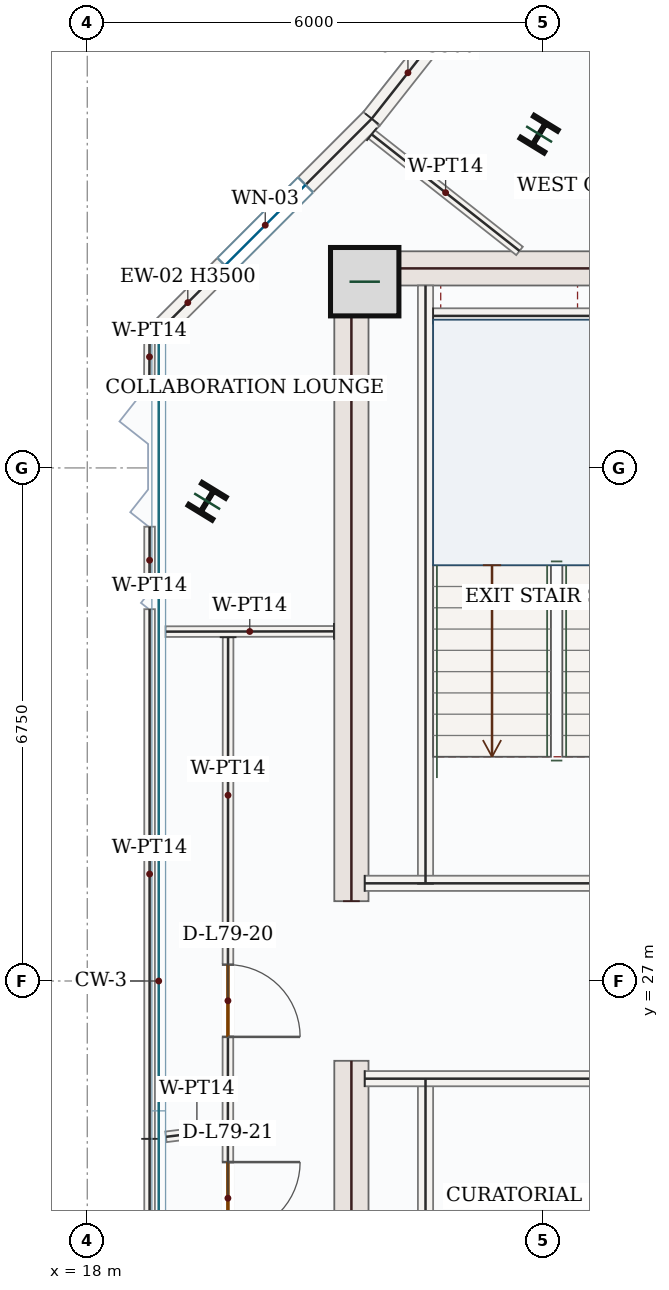
"""IFC4 building model, lengths in metres.
Left out: names, types, materials, properties, quantities, classifications, styles, units other than length and angle.
Written with IfcOpenShell. Run it as: python <this file> out.ifc"""

import sys

from ifc_helpers import new_model, si_unit, direction, frame, frame_2d, origin, origin_2d, place, context, subcontext, project, spatial, rectangle, i_section, extrude, source, transform, mapped, element, fill, save


model = new_model("IFC4")
c1 = context("Model", 3, precision=1e-05, world=origin(), true_north=direction((0.0, 1.0)))
c2 = subcontext(c1, "Body", "Model", "MODEL_VIEW")
j1 = project(units=[si_unit("LENGTHUNIT", "METRE"), si_unit("PLANEANGLEUNIT", "RADIAN")], contexts=[c1])
p1 = place(None, origin())
s1 = spatial("IfcSite", under=j1, at=p1, CompositionType="ELEMENT")
p2 = place(p1, origin())
s2 = spatial("IfcBuilding", under=s1, at=p2, CompositionType="ELEMENT")
p3 = place(p2, frame((0.0, 0.0, 327.3)))
s3 = spatial("IfcBuildingStorey", under=s2, at=p3, CompositionType="ELEMENT", Elevation=327.3)
m1 = source(origin(), c2, "Body", "SweptSolid", [
    extrude(rectangle(XDim=8.55, YDim=0.45, at=frame_2d((4.275, 0.0))), origin(), (0.0, 0.0, 1.0), 3.5),
])
for number, where, z_axis, x_axis in (
    (1, (21.475, 17.4, 0.0), (0.0, 0.0, 1.0), (0.0, 1.0, 0.0)),
    (2, (21.475, 28.05, 0.0), (0.0, 0.0, 1.0), (0.0, 1.0, 0.0)),
):
    element("IfcWall", number, at=place(p3, frame(where, z_axis=z_axis, x_axis=x_axis)), inside=s3, PredefinedType="SHEAR", context=c2, shape_type="MappedRepresentation", body=[
        mapped(m1, transform((0.0, 0.0, 0.0), x_axis=(1.0, 0.0, 0.0), y_axis=(0.0, 1.0, 0.0), z_axis=(0.0, 0.0, 1.0), scale=1.0)),
    ])
m2 = source(origin(), c2, "Body", "SweptSolid", [
    extrude(rectangle(XDim=7.1, YDim=0.45, at=frame_2d((3.55, 0.0))), origin(), (0.0, 0.0, 1.0), 3.5),
])
p4 = place(p3, frame((21.7, 36.375, 0.0), z_axis=(0.0, 0.0, 1.0), x_axis=(1.0, 0.0, 0.0)))
e3 = element("IfcWall", 3, at=p4, inside=s3, PredefinedType="SHEAR", context=c2, shape_type="MappedRepresentation", body=[
    mapped(m2, transform((0.0, 0.0, 0.0), x_axis=(1.0, 0.0, 0.0), y_axis=(0.0, 1.0, 0.0), z_axis=(0.0, 0.0, 1.0), scale=1.0)),
])
m3 = source(origin(), c2, "Body", "SweptSolid", [
    extrude(rectangle(XDim=0.9, YDim=0.9, at=origin_2d()), origin(), (0.0, 0.0, 1.0), 3.75),
])
p5 = place(p3, frame((21.65, 36.2, 0.0), z_axis=(0.0, 0.0, 1.0), x_axis=(1.0, 0.0, 0.0)))
e4 = element("IfcColumn", 4, at=p5, inside=s3, PredefinedType="COLUMN", context=c2, shape_type="MappedRepresentation", body=[
    mapped(m3, transform((0.0, 0.0, 0.0), x_axis=(1.0, 0.0, 0.0), y_axis=(0.0, 1.0, 0.0), z_axis=(0.0, 0.0, 1.0), scale=1.0)),
])
m4 = source(origin(), c2, "Body", "SweptSolid", [
    extrude(i_section(OverallWidth=0.369, OverallDepth=0.356, WebThickness=0.011, FlangeThickness=0.018, FilletRadius=0.018, at=origin_2d()), origin(), (0.0, 0.0, 1.0), 3.75),
])
for number, where, z_axis, x_axis in (
    (5, (23.945, 38.141, 0.0), (0.0, 0.0, 1.0), (-0.853, 0.522, 0.0)),
    (6, (19.577, 33.311, 0.0), (0.0, 0.0, 1.0), (-0.853, 0.522, 0.0)),
):
    element("IfcColumn", number, at=place(p3, frame(where, z_axis=z_axis, x_axis=x_axis)), inside=s3, PredefinedType="COLUMN", context=c2, shape_type="MappedRepresentation", body=[
        mapped(m4, transform((0.0, 0.0, 0.0), x_axis=(1.0, 0.0, 0.0), y_axis=(0.0, 1.0, 0.0), z_axis=(0.0, 0.0, 1.0), scale=1.0)),
    ])
p6 = place(p3, frame((18.94, 35.542, 0.0), z_axis=(0.0, 0.0, 1.0), x_axis=(0.707106781187, 0.707106781187, 0.0)))
e7 = element("IfcWall", 7, at=p6, inside=s3, PredefinedType="SOLIDWALL", context=c2, shape_type="SweptSolid", body=[
    extrude(rectangle(XDim=3.963, YDim=0.28, at=frame_2d((1.982, 0.0))), origin(), (0.0, 0.0, 1.0), 3.5),
])
p7 = place(p6, frame((1.232, 0.0, 0.85)))
e8 = element("IfcOpeningElement", 8, at=p7, cuts=e7, PredefinedType="OPENING", context=c2, shape_type="SweptSolid", body=[
    extrude(rectangle(XDim=1.5, YDim=1.5, at=frame_2d((0.75, 0.75))), frame((0.0, 0.15, 0.0), z_axis=(0.0, -1.0, 0.0), x_axis=(1.0, 0.0, 0.0)), (0.0, 0.0, 1.0), 0.3),
])
p8 = place(p3, frame((21.742, 38.344, 0.0), z_axis=(0.0, 0.0, 1.0), x_axis=(0.619093990715, 0.785316898239, 0.0)))
e9 = element("IfcWall", 9, at=p8, inside=s3, PredefinedType="SOLIDWALL", context=c2, shape_type="SweptSolid", body=[
    extrude(rectangle(XDim=4.878, YDim=0.28, at=frame_2d((2.439, 0.0))), origin(), (0.0, 0.0, 1.0), 3.5),
])
p9 = place(p8, frame((1.689, 0.0, 0.85)))
e10 = element("IfcOpeningElement", 10, at=p9, cuts=e9, PredefinedType="OPENING", context=c2, shape_type="SweptSolid", body=[
    extrude(rectangle(XDim=1.5, YDim=1.5, at=frame_2d((0.75, 0.75))), frame((0.0, 0.15, 0.0), z_axis=(0.0, -1.0, 0.0), x_axis=(1.0, 0.0, 0.0)), (0.0, 0.0, 1.0), 0.3),
])
m5 = source(origin(), c2, "Body", "SweptSolid", [
    extrude(rectangle(XDim=7.87, YDim=0.2, at=frame_2d((3.935, 0.0))), origin(), (0.0, 0.0, 1.0), 3.5),
])
for number, where, z_axis, x_axis in (
    (11, (22.45, 17.85, 0.0), (0.0, 0.0, 1.0), (0.0, 1.0, 0.0)),
    (12, (22.45, 28.28, 0.0), (0.0, 0.0, 1.0), (0.0, 1.0, 0.0)),
):
    element("IfcWall", number, at=place(p3, frame(where, z_axis=z_axis, x_axis=x_axis)), inside=s3, PredefinedType="SOLIDWALL", context=c2, shape_type="MappedRepresentation", body=[
        mapped(m5, transform((0.0, 0.0, 0.0), x_axis=(1.0, 0.0, 0.0), y_axis=(0.0, 1.0, 0.0), z_axis=(0.0, 0.0, 1.0), scale=1.0)),
    ])
m6 = source(origin(), c2, "Body", "SweptSolid", [
    extrude(rectangle(XDim=4.25, YDim=0.2, at=frame_2d((2.125, 0.0))), origin(), (0.0, 0.0, 1.0), 3.5),
])
for number, where, z_axis, x_axis in (
    (13, (21.65, 25.715, 0.0), (0.0, 0.0, 1.0), (1.0, 0.0, 0.0)),
    (14, (21.65, 28.285, 0.0), (0.0, 0.0, 1.0), (1.0, 0.0, 0.0)),
):
    element("IfcWall", number, at=place(p3, frame(where, z_axis=z_axis, x_axis=x_axis)), inside=s3, PredefinedType="SOLIDWALL", context=c2, shape_type="MappedRepresentation", body=[
        mapped(m6, transform((0.0, 0.0, 0.0), x_axis=(1.0, 0.0, 0.0), y_axis=(0.0, 1.0, 0.0), z_axis=(0.0, 0.0, 1.0), scale=1.0)),
    ])
m7 = source(origin(), c2, "Body", "SweptSolid", [
    extrude(rectangle(XDim=3.25, YDim=0.2, at=frame_2d((1.625, 0.0))), origin(), (0.0, 0.0, 1.0), 3.5),
])
p10 = place(p3, frame((22.55, 35.75, 0.0), z_axis=(0.0, 0.0, 1.0), x_axis=(1.0, 0.0, 0.0)))
e15 = element("IfcWall", 15, at=p10, inside=s3, PredefinedType="SOLIDWALL", context=c2, shape_type="MappedRepresentation", body=[
    mapped(m7, transform((0.0, 0.0, 0.0), x_axis=(1.0, 0.0, 0.0), y_axis=(0.0, 1.0, 0.0), z_axis=(0.0, 0.0, 1.0), scale=1.0)),
])
m8 = source(origin(), c2, "Body", "SweptSolid", [
    extrude(rectangle(XDim=2.215, YDim=0.14, at=frame_2d((1.107, 0.0))), origin(), (0.0, 0.0, 1.0), 3.5),
])
p11 = place(p3, frame((21.245, 31.6, 0.0), z_axis=(0.0, 0.0, 1.0), x_axis=(-0.999998633374, -0.001653254657, 0.0)))
e16 = element("IfcWall", 16, at=p11, inside=s3, PredefinedType="PARTITIONING", context=c2, shape_type="MappedRepresentation", body=[
    mapped(m8, transform((0.0, 0.0, 0.0), x_axis=(1.0, 0.0, 0.0), y_axis=(0.0, 1.0, 0.0), z_axis=(0.0, 0.0, 1.0), scale=1.0)),
])
p12 = place(p3, frame((19.853, 31.523, 0.0), z_axis=(0.0, 0.0, 1.0), x_axis=(-0.000377187662, -0.999999928865, 0.0)))
e17 = element("IfcWall", 17, at=p12, inside=s3, PredefinedType="PARTITIONING", context=c2, shape_type="SweptSolid", body=[
    extrude(rectangle(XDim=6.473, YDim=0.14, at=frame_2d((3.236, 0.0))), origin(), (0.0, 0.0, 1.0), 3.5),
])
p13 = place(p12, frame((4.308, 0.0, 0.0)))
e18 = element("IfcOpeningElement", 18, at=p13, cuts=e17, PredefinedType="OPENING", context=c2, shape_type="SweptSolid", body=[
    extrude(rectangle(XDim=0.95, YDim=2.15, at=frame_2d((0.475, 1.075))), frame((0.0, 0.08, 0.0), z_axis=(0.0, -1.0, 0.0), x_axis=(1.0, 0.0, 0.0)), (0.0, 0.0, 1.0), 0.16),
])
m9 = source(origin(), c2, "Body", "SweptSolid", [
    extrude(rectangle(XDim=0.821, YDim=0.14, at=frame_2d((0.41, 0.0))), origin(), (0.0, 0.0, 1.0), 3.5),
])
p14 = place(p3, frame((19.85, 25.05, 0.0), z_axis=(0.0, 0.0, 1.0), x_axis=(-0.992500466698, -0.122240842617, 0.0)))
e19 = element("IfcWall", 19, at=p14, inside=s3, PredefinedType="PARTITIONING", context=c2, shape_type="MappedRepresentation", body=[
    mapped(m9, transform((0.0, 0.0, 0.0), x_axis=(1.0, 0.0, 0.0), y_axis=(0.0, 1.0, 0.0), z_axis=(0.0, 0.0, 1.0), scale=1.0)),
])
m10 = source(origin(), c2, "Body", "SweptSolid", [
    extrude(rectangle(XDim=6.968, YDim=0.14, at=frame_2d((3.484, 0.0))), origin(), (0.0, 0.0, 1.0), 3.5),
])
p15 = place(p3, frame((18.82, 24.923, 0.0), z_axis=(0.0, 0.0, 1.0), x_axis=(0.0, 1.0, 0.0)))
e20 = element("IfcWall", 20, at=p15, inside=s3, PredefinedType="PARTITIONING", context=c2, shape_type="MappedRepresentation", body=[
    mapped(m10, transform((0.0, 0.0, 0.0), x_axis=(1.0, 0.0, 0.0), y_axis=(0.0, 1.0, 0.0), z_axis=(0.0, 0.0, 1.0), scale=1.0)),
])
m11 = source(origin(), c2, "Body", "SweptSolid", [
    extrude(rectangle(XDim=0.882, YDim=0.14, at=frame_2d((0.441, 0.0))), origin(), (0.0, 0.0, 1.0), 3.5),
])
p16 = place(p3, frame((18.82, 32.095, 0.0), z_axis=(0.0, 0.0, 1.0), x_axis=(0.000553556516, 0.999999846788, 0.0)))
e21 = element("IfcWall", 21, at=p16, inside=s3, PredefinedType="PARTITIONING", context=c2, shape_type="MappedRepresentation", body=[
    mapped(m11, transform((0.0, 0.0, 0.0), x_axis=(1.0, 0.0, 0.0), y_axis=(0.0, 1.0, 0.0), z_axis=(0.0, 0.0, 1.0), scale=1.0)),
])
m12 = source(origin(), c2, "Body", "SweptSolid", [
    extrude(rectangle(XDim=0.762, YDim=0.14, at=frame_2d((0.381, 0.0))), origin(), (0.0, 0.0, 1.0), 3.5),
])
p17 = place(p3, frame((18.817, 34.83, 0.0), z_axis=(0.0, 0.0, 1.0), x_axis=(0.004166630498, 0.999991319557, 0.0)))
e22 = element("IfcWall", 22, at=p17, inside=s3, PredefinedType="PARTITIONING", context=c2, shape_type="MappedRepresentation", body=[
    mapped(m12, transform((0.0, 0.0, 0.0), x_axis=(1.0, 0.0, 0.0), y_axis=(0.0, 1.0, 0.0), z_axis=(0.0, 0.0, 1.0), scale=1.0)),
])
m13 = source(origin(), c2, "Body", "SweptSolid", [
    extrude(rectangle(XDim=2.477, YDim=0.14, at=frame_2d((1.239, 0.0))), origin(), (0.0, 0.0, 1.0), 3.5),
])
p18 = place(p3, frame((21.742, 38.138, 0.0), z_axis=(0.0, 0.0, 1.0), x_axis=(0.785339198937, -0.619065701371, 0.0)))
e23 = element("IfcWall", 23, at=p18, inside=s3, PredefinedType="PARTITIONING", context=c2, shape_type="MappedRepresentation", body=[
    mapped(m13, transform((0.0, 0.0, 0.0), x_axis=(1.0, 0.0, 0.0), y_axis=(0.0, 1.0, 0.0), z_axis=(0.0, 0.0, 1.0), scale=1.0)),
])
p19 = place(p3, frame((19.85, 24.975, 0.0), z_axis=(0.0, 0.0, 1.0), x_axis=(0.000379434615, -0.999999928015, 0.0)))
e24 = element("IfcWall", 24, at=p19, inside=s3, PredefinedType="PARTITIONING", context=c2, shape_type="SweptSolid", body=[
    extrude(rectangle(XDim=2.574, YDim=0.14, at=frame_2d((1.287, 0.0))), origin(), (0.0, 0.0, 1.0), 3.5),
])
p20 = place(p19, frame((0.357, 0.0, 0.0)))
e25 = element("IfcOpeningElement", 25, at=p20, cuts=e24, PredefinedType="OPENING", context=c2, shape_type="SweptSolid", body=[
    extrude(rectangle(XDim=0.95, YDim=2.15, at=frame_2d((0.475, 1.075))), frame((0.0, 0.08, 0.0), z_axis=(0.0, -1.0, 0.0), x_axis=(1.0, 0.0, 0.0)), (0.0, 0.0, 1.0), 0.16),
])
m14 = source(origin(), c2, "Body", "SweptSolid", [
    extrude(rectangle(XDim=6.515, YDim=0.14, at=frame_2d((3.258, 0.0))), origin(), (0.0, 0.0, 1.0), 3.5),
])
p21 = place(p3, frame((18.82, 18.408, 0.0), z_axis=(0.0, 0.0, 1.0), x_axis=(0.0, 1.0, 0.0)))
e26 = element("IfcWall", 26, at=p21, inside=s3, PredefinedType="PARTITIONING", context=c2, shape_type="MappedRepresentation", body=[
    mapped(m14, transform((0.0, 0.0, 0.0), x_axis=(1.0, 0.0, 0.0), y_axis=(0.0, 1.0, 0.0), z_axis=(0.0, 0.0, 1.0), scale=1.0)),
])
m15 = source(origin(), c2, "Body", "SweptSolid", [
    extrude(rectangle(XDim=1.5, YDim=1.5, at=frame_2d((0.75, 0.75))), frame((0.0, 0.03, 0.0), z_axis=(0.0, -1.0, 0.0), x_axis=(1.0, 0.0, 0.0)), (0.0, 0.0, 1.0), 0.06),
])
p22 = place(p7, origin())
e27 = element("IfcWindow", 27, at=p22, inside=s3, PartitioningType="SINGLE_PANEL", PredefinedType="WINDOW", context=c2, shape_type="MappedRepresentation", body=[
    mapped(m15, transform((0.0, 0.0, 0.0), x_axis=(1.0, 0.0, 0.0), y_axis=(0.0, 1.0, 0.0), z_axis=(0.0, 0.0, 1.0), scale=1.0)),
])
fill(e8, e27)
m16 = source(origin(), c2, "Body", "SweptSolid", [
    extrude(rectangle(XDim=0.95, YDim=2.15, at=frame_2d((0.475, 1.075))), frame((0.0, 0.025, 0.0), z_axis=(0.0, -1.0, 0.0), x_axis=(1.0, 0.0, 0.0)), (0.0, 0.0, 1.0), 0.05),
])
p23 = place(p13, origin())
e28 = element("IfcDoor", 28, at=p23, inside=s3, OperationType="SINGLE_SWING_RIGHT", PredefinedType="DOOR", context=c2, shape_type="MappedRepresentation", body=[
    mapped(m16, transform((0.0, 0.0, 0.0), x_axis=(1.0, 0.0, 0.0), y_axis=(0.0, 1.0, 0.0), z_axis=(0.0, 0.0, 1.0), scale=1.0)),
])
fill(e18, e28)
p24 = place(p20, origin())
e29 = element("IfcDoor", 29, at=p24, inside=s3, OperationType="SINGLE_SWING_LEFT", PredefinedType="DOOR", context=c2, shape_type="MappedRepresentation", body=[
    mapped(m16, transform((0.0, 0.0, 0.0), x_axis=(1.0, 0.0, 0.0), y_axis=(0.0, 1.0, 0.0), z_axis=(0.0, 0.0, 1.0), scale=1.0)),
])
fill(e25, e29)
save(model, sys.argv[1])
